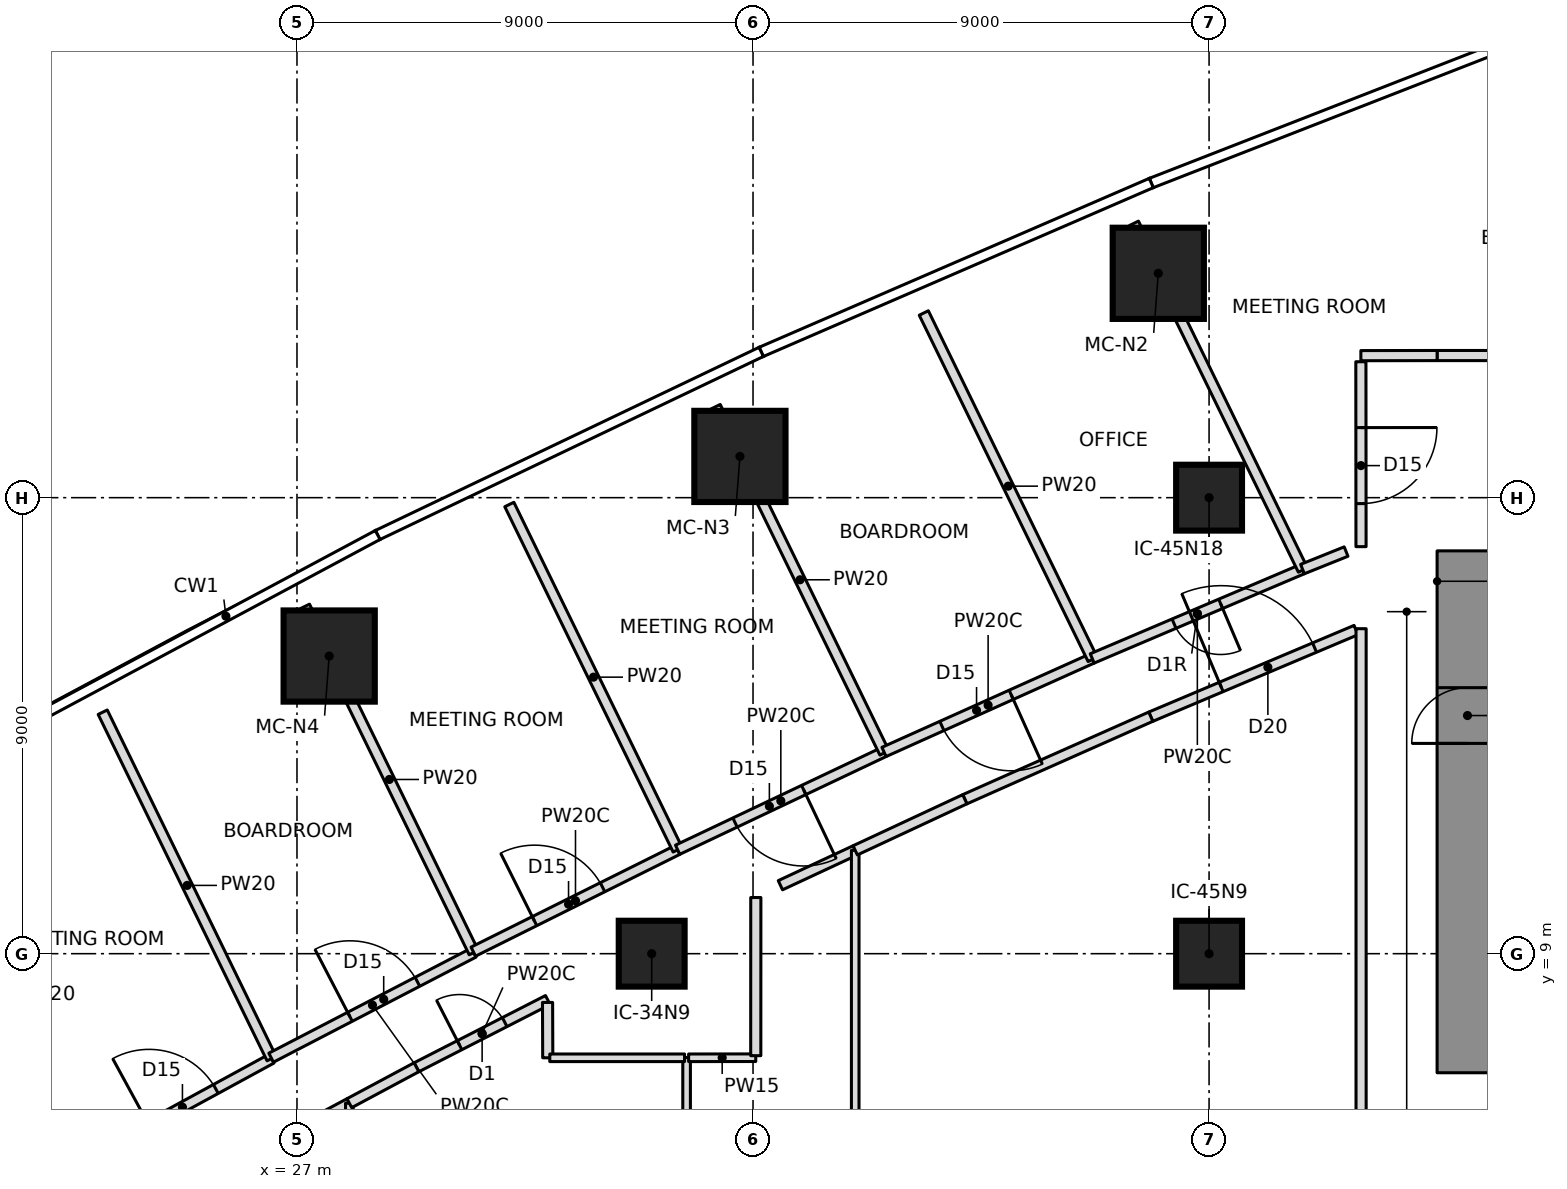
"""IFC4 building model, lengths in metres.
Left out: names, types, materials, properties, quantities, classifications, styles, units other than length and angle.
Written with IfcOpenShell. Run it as: python <this file> out.ifc"""

import sys

from ifc_helpers import new_model, si_unit, direction, frame, frame_2d, origin, origin_2d, place, context, subcontext, project, spatial, rectangle, extrude, element, fill, save


model = new_model("IFC4")
c1 = context("Model", 3, precision=1e-05, world=origin(), true_north=direction((0.0, 1.0)))
c2 = subcontext(c1, "Body", "Model", "MODEL_VIEW")
j1 = project(units=[si_unit("LENGTHUNIT", "METRE"), si_unit("PLANEANGLEUNIT", "RADIAN")], contexts=[c1])
p1 = place(None, origin())
s1 = spatial("IfcSite", under=j1, at=p1, CompositionType="ELEMENT")
p2 = place(p1, origin())
s2 = spatial("IfcBuilding", under=s1, at=p2, CompositionType="ELEMENT")
p3 = place(p2, frame((0.0, 0.0, 46.7)))
s3 = spatial("IfcBuildingStorey", under=s2, at=p3, CompositionType="ELEMENT", Elevation=46.7)
p4 = place(p3, frame((50.1, 6.65, 0.0), z_axis=(0.0, 0.0, 1.0), x_axis=(0.0, 1.0, 0.0)))
e1 = element("IfcWall", 1, at=p4, inside=s3, PredefinedType="SHEAR", context=c2, shape_type="SweptSolid", body=[
    extrude(rectangle(XDim=10.3, YDim=1.2, at=frame_2d((5.15, 0.0))), origin(), (0.0, 0.0, 1.0), 3.55),
])
p5 = place(p4, frame((6.5, 0.0, 0.0)))
e2 = element("IfcOpeningElement", 2, at=p5, cuts=e1, PredefinedType="OPENING", context=c2, shape_type="SweptSolid", body=[
    extrude(rectangle(XDim=1.1, YDim=2.1, at=frame_2d((0.55, 1.05))), frame((0.0, 0.61, 0.0), z_axis=(0.0, -1.0, 0.0), x_axis=(1.0, 0.0, 0.0)), (0.0, 0.0, 1.0), 1.22),
])
for number, where, z_axis, x_axis in (
    (3, (43.998, 22.428, 0.0), (0.0, 0.0, 1.0), (1.0, 0.0, 0.0)),
    (4, (35.741, 18.814, 0.0), (0.0, 0.0, 1.0), (1.0, 0.0, 0.0)),
    (5, (27.635, 14.874, 0.0), (0.0, 0.0, 1.0), (1.0, 0.0, 0.0)),
):
    element("IfcColumn", number, at=place(p3, frame(where, z_axis=z_axis, x_axis=x_axis)), inside=s3, PredefinedType="COLUMN", context=c2, shape_type="SweptSolid", body=[
        extrude(rectangle(XDim=1.8, YDim=1.8, at=origin_2d()), origin(), (0.0, 0.0, 1.0), 3.55),
    ])
for number, where, z_axis, x_axis in (
    (6, (34.0, 9.0, 0.0), (0.0, 0.0, 1.0), (1.0, 0.0, 0.0)),
    (7, (45.0, 9.0, 0.0), (0.0, 0.0, 1.0), (1.0, 0.0, 0.0)),
    (8, (45.0, 18.0, 0.0), (0.0, 0.0, 1.0), (1.0, 0.0, 0.0)),
):
    element("IfcColumn", number, at=place(p3, frame(where, z_axis=z_axis, x_axis=x_axis)), inside=s3, PredefinedType="COLUMN", context=c2, shape_type="SweptSolid", body=[
        extrude(rectangle(XDim=1.3, YDim=1.3, at=origin_2d()), origin(), (0.0, 0.0, 1.0), 3.55),
    ])
p6 = place(p3, frame((22.55, 4.755, 0.0), z_axis=(0.0, 0.0, 1.0), x_axis=(-0.438210669268, 0.898872298683, 0.0)))
e9 = element("IfcWall", 9, at=p6, inside=s3, PredefinedType="PARTITIONING", context=c2, shape_type="SweptSolid", body=[
    extrude(rectangle(XDim=7.612, YDim=0.2, at=frame_2d((3.806, 0.0))), origin(), (0.0, 0.0, 1.0), 3.25),
])
p7 = place(p3, frame((22.541, 4.773, 0.0), z_axis=(0.0, 0.0, 1.0), x_axis=(0.878098348451, 0.478480188146, 0.0)))
e10 = element("IfcWall", 10, at=p7, inside=s3, PredefinedType="PARTITIONING", context=c2, shape_type="SweptSolid", body=[
    extrude(rectangle(XDim=4.508, YDim=0.2, at=frame_2d((2.254, 0.0))), origin(), (0.0, 0.0, 1.0), 3.25),
])
p8 = place(p7, frame((1.754, 0.0, 0.0)))
e11 = element("IfcOpeningElement", 11, at=p8, cuts=e10, PredefinedType="OPENING", context=c2, shape_type="SweptSolid", body=[
    extrude(rectangle(XDim=1.5, YDim=2.1, at=frame_2d((0.75, 1.05))), frame((0.0, 0.11, 0.0), z_axis=(0.0, -1.0, 0.0), x_axis=(1.0, 0.0, 0.0)), (0.0, 0.0, 1.0), 0.22),
])
p9 = place(p3, frame((26.499, 6.929, 0.0), z_axis=(0.0, 0.0, 1.0), x_axis=(-0.438215539964, 0.898869924146, 0.0)))
e12 = element("IfcWall", 12, at=p9, inside=s3, PredefinedType="PARTITIONING", context=c2, shape_type="SweptSolid", body=[
    extrude(rectangle(XDim=7.605, YDim=0.2, at=frame_2d((3.803, 0.0))), origin(), (0.0, 0.0, 1.0), 3.25),
])
p10 = place(p3, frame((26.49, 6.948, 0.0), z_axis=(0.0, 0.0, 1.0), x_axis=(0.887638836985, 0.460540220911, 0.0)))
e13 = element("IfcWall", 13, at=p10, inside=s3, PredefinedType="PARTITIONING", context=c2, shape_type="SweptSolid", body=[
    extrude(rectangle(XDim=4.504, YDim=0.2, at=frame_2d((2.252, 0.0))), origin(), (0.0, 0.0, 1.0), 3.25),
])
p11 = place(p10, frame((1.752, 0.0, 0.0)))
e14 = element("IfcOpeningElement", 14, at=p11, cuts=e13, PredefinedType="OPENING", context=c2, shape_type="SweptSolid", body=[
    extrude(rectangle(XDim=1.5, YDim=2.1, at=frame_2d((0.75, 1.05))), frame((0.0, 0.11, 0.0), z_axis=(0.0, -1.0, 0.0), x_axis=(1.0, 0.0, 0.0)), (0.0, 0.0, 1.0), 0.22),
])
p12 = place(p3, frame((30.489, 9.022, 0.0), z_axis=(0.0, 0.0, 1.0), x_axis=(-0.43822365664, 0.898865967072, 0.0)))
e15 = element("IfcWall", 15, at=p12, inside=s3, PredefinedType="PARTITIONING", context=c2, shape_type="SweptSolid", body=[
    extrude(rectangle(XDim=7.601, YDim=0.2, at=frame_2d((3.801, 0.0))), origin(), (0.0, 0.0, 1.0), 3.25),
])
p13 = place(p3, frame((30.48, 9.04, 0.0), z_axis=(0.0, 0.0, 1.0), x_axis=(0.894989913054, 0.446086376761, 0.0)))
e16 = element("IfcWall", 16, at=p13, inside=s3, PredefinedType="PARTITIONING", context=c2, shape_type="SweptSolid", body=[
    extrude(rectangle(XDim=4.506, YDim=0.2, at=frame_2d((2.253, 0.0))), origin(), (0.0, 0.0, 1.0), 3.25),
])
p14 = place(p13, frame((1.35, 0.0, 0.0)))
e17 = element("IfcOpeningElement", 17, at=p14, cuts=e16, PredefinedType="OPENING", context=c2, shape_type="SweptSolid", body=[
    extrude(rectangle(XDim=1.5, YDim=2.1, at=frame_2d((0.75, 1.05))), frame((0.0, 0.11, 0.0), z_axis=(0.0, -1.0, 0.0), x_axis=(1.0, 0.0, 0.0)), (0.0, 0.0, 1.0), 0.22),
])
p15 = place(p3, frame((34.513, 11.05, 0.0), z_axis=(0.0, 0.0, 1.0), x_axis=(-0.438187612283, 0.898883538865, 0.0)))
e18 = element("IfcWall", 18, at=p15, inside=s3, PredefinedType="PARTITIONING", context=c2, shape_type="SweptSolid", body=[
    extrude(rectangle(XDim=7.582, YDim=0.2, at=frame_2d((3.791, 0.0))), origin(), (0.0, 0.0, 1.0), 3.25),
])
p16 = place(p3, frame((38.585, 12.981, 0.0), z_axis=(0.0, 0.0, 1.0), x_axis=(-0.903706948966, -0.428151550727, 0.0)))
e19 = element("IfcWall", 19, at=p16, inside=s3, PredefinedType="PARTITIONING", context=c2, shape_type="SweptSolid", body=[
    extrude(rectangle(XDim=4.506, YDim=0.2, at=frame_2d((2.253, 0.0))), origin(), (0.0, 0.0, 1.0), 3.25),
])
p17 = place(p16, frame((1.753, 0.0, 0.0)))
e20 = element("IfcOpeningElement", 20, at=p17, cuts=e19, PredefinedType="OPENING", context=c2, shape_type="SweptSolid", body=[
    extrude(rectangle(XDim=1.5, YDim=2.1, at=frame_2d((0.75, 1.05))), frame((0.0, 0.11, 0.0), z_axis=(0.0, -1.0, 0.0), x_axis=(1.0, 0.0, 0.0)), (0.0, 0.0, 1.0), 0.22),
])
p18 = place(p3, frame((38.594, 12.963, 0.0), z_axis=(0.0, 0.0, 1.0), x_axis=(-0.438197705697, 0.898878618459, 0.0)))
e21 = element("IfcWall", 21, at=p18, inside=s3, PredefinedType="PARTITIONING", context=c2, shape_type="SweptSolid", body=[
    extrude(rectangle(XDim=7.601, YDim=0.2, at=frame_2d((3.801, 0.0))), origin(), (0.0, 0.0, 1.0), 3.25),
])
p19 = place(p3, frame((42.694, 14.827, 0.0), z_axis=(0.0, 0.0, 1.0), x_axis=(-0.912193063794, -0.409760679381, 0.0)))
e22 = element("IfcWall", 22, at=p19, inside=s3, PredefinedType="PARTITIONING", context=c2, shape_type="SweptSolid", body=[
    extrude(rectangle(XDim=4.505, YDim=0.2, at=frame_2d((2.252, 0.0))), origin(), (0.0, 0.0, 1.0), 3.25),
])
p20 = place(p19, frame((1.752, 0.0, 0.0)))
e23 = element("IfcOpeningElement", 23, at=p20, cuts=e22, PredefinedType="OPENING", context=c2, shape_type="SweptSolid", body=[
    extrude(rectangle(XDim=1.5, YDim=2.1, at=frame_2d((0.75, 1.05))), frame((0.0, 0.11, 0.0), z_axis=(0.0, -1.0, 0.0), x_axis=(1.0, 0.0, 0.0)), (0.0, 0.0, 1.0), 0.22),
])
p21 = place(p3, frame((42.703, 14.809, 0.0), z_axis=(0.0, 0.0, 1.0), x_axis=(-0.438202247191, 0.898876404494, 0.0)))
e24 = element("IfcWall", 24, at=p21, inside=s3, PredefinedType="PARTITIONING", context=c2, shape_type="SweptSolid", body=[
    extrude(rectangle(XDim=7.605, YDim=0.2, at=frame_2d((3.802, 0.0))), origin(), (0.0, 0.0, 1.0), 3.25),
])
p22 = place(p3, frame((46.844, 16.591, 0.0), z_axis=(0.0, 0.0, 1.0), x_axis=(-0.92031727314, -0.39117274542, 0.0)))
e25 = element("IfcWall", 25, at=p22, inside=s3, PredefinedType="PARTITIONING", context=c2, shape_type="SweptSolid", body=[
    extrude(rectangle(XDim=4.509, YDim=0.2, at=frame_2d((2.254, 0.0))), origin(), (0.0, 0.0, 1.0), 3.25),
])
p23 = place(p22, frame((1.754, 0.0, 0.0)))
e26 = element("IfcOpeningElement", 26, at=p23, cuts=e25, PredefinedType="OPENING", context=c2, shape_type="SweptSolid", body=[
    extrude(rectangle(XDim=1.0, YDim=2.1, at=frame_2d((0.5, 1.05))), frame((0.0, 0.11, 0.0), z_axis=(0.0, -1.0, 0.0), x_axis=(1.0, 0.0, 0.0)), (0.0, 0.0, 1.0), 0.22),
])
p24 = place(p3, frame((46.852, 16.573, 0.0), z_axis=(0.0, 0.0, 1.0), x_axis=(-0.438196739796, 0.898879089328, 0.0)))
e27 = element("IfcWall", 27, at=p24, inside=s3, PredefinedType="PARTITIONING", context=c2, shape_type="SweptSolid", body=[
    extrude(rectangle(XDim=7.611, YDim=0.2, at=frame_2d((3.806, 0.0))), origin(), (0.0, 0.0, 1.0), 3.25),
])
p25 = place(p3, frame((25.817, 4.863, 0.0), z_axis=(0.0, 0.0, 1.0), x_axis=(0.881650280758, 0.471903361335, 0.0)))
e28 = element("IfcWall", 28, at=p25, inside=s3, PredefinedType="PARTITIONING", context=c2, shape_type="SweptSolid", body=[
    extrude(rectangle(XDim=2.514, YDim=0.2, at=frame_2d((1.257, 0.0))), origin(), (0.0, 0.0, 1.0), 3.25),
])
p26 = place(p3, frame((28.033, -6.049, 0.0), z_axis=(0.0, 0.0, 1.0), x_axis=(0.0, 1.0, 0.0)))
e29 = element("IfcWall", 29, at=p26, inside=s3, PredefinedType="PARTITIONING", context=c2, shape_type="SweptSolid", body=[
    extrude(rectangle(XDim=12.099, YDim=0.15, at=frame_2d((6.049, 0.0))), origin(), (0.0, 0.0, 1.0), 3.25),
])
p27 = place(p3, frame((29.357, 6.758, 0.0), z_axis=(0.0, 0.0, 1.0), x_axis=(0.890213377055, 0.455543788579, 0.0)))
e30 = element("IfcWall", 30, at=p27, inside=s3, PredefinedType="PARTITIONING", context=c2, shape_type="SweptSolid", body=[
    extrude(rectangle(XDim=2.912, YDim=0.2, at=frame_2d((1.456, 0.0))), origin(), (0.0, 0.0, 1.0), 3.25),
])
p28 = place(p27, frame((0.956, 0.0, 0.0)))
e31 = element("IfcOpeningElement", 31, at=p28, cuts=e30, PredefinedType="OPENING", context=c2, shape_type="SweptSolid", body=[
    extrude(rectangle(XDim=1.0, YDim=2.1, at=frame_2d((0.5, 1.05))), frame((0.0, 0.11, 0.0), z_axis=(0.0, -1.0, 0.0), x_axis=(1.0, 0.0, 0.0)), (0.0, 0.0, 1.0), 0.22),
])
p29 = place(p3, frame((28.033, 6.049, 0.0), z_axis=(0.0, 0.0, 1.0), x_axis=(0.881663555886, 0.471878558764, 0.0)))
e32 = element("IfcWall", 32, at=p29, inside=s3, PredefinedType="PARTITIONING", context=c2, shape_type="SweptSolid", body=[
    extrude(rectangle(XDim=1.502, YDim=0.2, at=frame_2d((0.751, 0.0))), origin(), (0.0, 0.0, 1.0), 3.25),
])
p30 = place(p3, frame((34.689, -6.95, 0.0), z_axis=(0.0, 0.0, 1.0), x_axis=(0.0, 1.0, 0.0)))
e33 = element("IfcWall", 33, at=p30, inside=s3, PredefinedType="PARTITIONING", context=c2, shape_type="SweptSolid", body=[
    extrude(rectangle(XDim=13.9, YDim=0.15, at=frame_2d((6.95, 0.0))), origin(), (0.0, 0.0, 1.0), 3.25),
])
p31 = place(p3, frame((36.54, 10.351, 0.0), z_axis=(0.0, 0.0, 1.0), x_axis=(0.906378304335, 0.422467003955, 0.0)))
e34 = element("IfcWall", 34, at=p31, inside=s3, PredefinedType="PARTITIONING", context=c2, shape_type="SweptSolid", body=[
    extrude(rectangle(XDim=1.629, YDim=0.2, at=frame_2d((0.814, 0.0))), origin(), (0.0, 0.0, 1.0), 3.25),
])
p32 = place(p3, frame((38.017, -11.039, 0.0), z_axis=(0.0, 0.0, 1.0), x_axis=(0.0, 1.0, 0.0)))
e35 = element("IfcWall", 35, at=p32, inside=s3, PredefinedType="PARTITIONING", context=c2, shape_type="SweptSolid", body=[
    extrude(rectangle(XDim=22.079, YDim=0.15, at=frame_2d((11.039, 0.0))), origin(), (0.0, 0.0, 1.0), 3.25),
])
p33 = place(p3, frame((43.85, 13.677, 0.0), z_axis=(0.0, 0.0, 1.0), x_axis=(0.921265924084, 0.388933281068, 0.0)))
e36 = element("IfcWall", 36, at=p33, inside=s3, PredefinedType="PARTITIONING", context=c2, shape_type="SweptSolid", body=[
    extrude(rectangle(XDim=4.396, YDim=0.2, at=frame_2d((2.198, 0.0))), origin(), (0.0, 0.0, 1.0), 3.25),
])
p34 = place(p33, frame((1.508, 0.0, 0.0)))
e37 = element("IfcOpeningElement", 37, at=p34, cuts=e36, PredefinedType="OPENING", context=c2, shape_type="SweptSolid", body=[
    extrude(rectangle(XDim=2.0, YDim=2.4, at=frame_2d((1.0, 1.2))), frame((0.0, 0.11, 0.0), z_axis=(0.0, -1.0, 0.0), x_axis=(1.0, 0.0, 0.0)), (0.0, 0.0, 1.0), 0.22),
])
p35 = place(p3, frame((40.18, 12.048, 0.0), z_axis=(0.0, 0.0, 1.0), x_axis=(0.913986953061, 0.405743576209, 0.0)))
e38 = element("IfcWall", 38, at=p35, inside=s3, PredefinedType="PARTITIONING", context=c2, shape_type="SweptSolid", body=[
    extrude(rectangle(XDim=4.016, YDim=0.2, at=frame_2d((2.008, 0.0))), origin(), (0.0, 0.0, 1.0), 3.25),
])
p36 = place(p3, frame((38.017, 11.039, 0.0), z_axis=(0.0, 0.0, 1.0), x_axis=(0.906326822236, 0.422577438223, 0.0)))
e39 = element("IfcWall", 39, at=p36, inside=s3, PredefinedType="PARTITIONING", context=c2, shape_type="SweptSolid", body=[
    extrude(rectangle(XDim=2.387, YDim=0.2, at=frame_2d((1.193, 0.0))), origin(), (0.0, 0.0, 1.0), 3.25),
])
p37 = place(p3, frame((54.597, 20.805, 0.0), z_axis=(0.0, 0.0, 1.0), x_axis=(-1.0, 0.0, 0.0)))
e40 = element("IfcWall", 40, at=p37, inside=s3, PredefinedType="PARTITIONING", context=c2, shape_type="SweptSolid", body=[
    extrude(rectangle(XDim=5.097, YDim=0.2, at=frame_2d((2.548, 0.0))), origin(), (0.0, 0.0, 1.0), 3.25),
])
p38 = place(p37, frame((2.048, 0.0, 0.0)))
e41 = element("IfcOpeningElement", 41, at=p38, cuts=e40, PredefinedType="OPENING", context=c2, shape_type="SweptSolid", body=[
    extrude(rectangle(XDim=1.5, YDim=2.1, at=frame_2d((0.75, 1.05))), frame((0.0, 0.11, 0.0), z_axis=(0.0, -1.0, 0.0), x_axis=(1.0, 0.0, 0.0)), (0.0, 0.0, 1.0), 0.22),
])
p39 = place(p3, frame((47.704, 16.936, 0.0), z_axis=(0.0, 0.0, 1.0), x_axis=(-0.927985537407, -0.372616213232, 0.0)))
e42 = element("IfcWall", 42, at=p39, inside=s3, PredefinedType="PARTITIONING", context=c2, shape_type="SweptSolid", body=[
    extrude(rectangle(XDim=0.927, YDim=0.2, at=frame_2d((0.463, 0.0))), origin(), (0.0, 0.0, 1.0), 3.25),
])
p40 = place(p3, frame((31.945, 8.037, 0.0), z_axis=(0.0, 0.0, 1.0), x_axis=(0.003576195281, -0.999993605393, 0.0)))
e43 = element("IfcWall", 43, at=p40, inside=s3, PredefinedType="PARTITIONING", context=c2, shape_type="SweptSolid", body=[
    extrude(rectangle(XDim=1.092, YDim=0.2, at=frame_2d((0.546, 0.0))), origin(), (0.0, 0.0, 1.0), 3.25),
])
p41 = place(p3, frame((31.989, 6.945, 0.0), z_axis=(0.0, 0.0, 1.0), x_axis=(1.0, 0.0, 0.0)))
e44 = element("IfcWall", 44, at=p41, inside=s3, PredefinedType="PARTITIONING", context=c2, shape_type="SweptSolid", body=[
    extrude(rectangle(XDim=2.66, YDim=0.15, at=frame_2d((1.33, 0.0))), origin(), (0.0, 0.0, 1.0), 3.25),
])
p42 = place(p3, frame((34.729, 6.945, 0.0), z_axis=(0.0, 0.0, 1.0), x_axis=(0.999999168148, 0.001289845988, 0.0)))
e45 = element("IfcWall", 45, at=p42, inside=s3, PredefinedType="PARTITIONING", context=c2, shape_type="SweptSolid", body=[
    extrude(rectangle(XDim=1.325, YDim=0.15, at=frame_2d((0.663, 0.0))), origin(), (0.0, 0.0, 1.0), 3.25),
])
p43 = place(p3, frame((36.054, 6.987, 0.0), z_axis=(0.0, 0.0, 1.0), x_axis=(0.000312842156, 0.999999951065, 0.0)))
e46 = element("IfcWall", 46, at=p43, inside=s3, PredefinedType="PARTITIONING", context=c2, shape_type="SweptSolid", body=[
    extrude(rectangle(XDim=3.122, YDim=0.2, at=frame_2d((1.561, 0.0))), origin(), (0.0, 0.0, 1.0), 3.25),
])
p44 = place(p3, frame((48.0, 15.414, 0.0), z_axis=(0.0, 0.0, 1.0), x_axis=(0.0, -1.0, 0.0)))
e47 = element("IfcWall", 47, at=p44, inside=s3, PredefinedType="PARTITIONING", context=c2, shape_type="SweptSolid", body=[
    extrude(rectangle(XDim=30.828, YDim=0.2, at=frame_2d((15.414, 0.0))), origin(), (0.0, 0.0, 1.0), 3.25),
])
p45 = place(p3, frame((49.5, 20.805, 0.0), z_axis=(0.0, 0.0, 1.0), x_axis=(-0.999998933031, -0.001460800259, 0.0)))
e48 = element("IfcWall", 48, at=p45, inside=s3, PredefinedType="PARTITIONING", context=c2, shape_type="SweptSolid", body=[
    extrude(rectangle(XDim=1.504, YDim=0.2, at=frame_2d((0.752, 0.0))), origin(), (0.0, 0.0, 1.0), 3.25),
])
p46 = place(p3, frame((47.996, 20.683, 0.0), z_axis=(0.0, 0.0, 1.0), x_axis=(0.000802729021, -0.999999677813, 0.0)))
e49 = element("IfcWall", 49, at=p46, inside=s3, PredefinedType="PARTITIONING", context=c2, shape_type="SweptSolid", body=[
    extrude(rectangle(XDim=3.65, YDim=0.2, at=frame_2d((1.825, 0.0))), origin(), (0.0, 0.0, 1.0), 3.25),
])
p47 = place(p46, frame((1.3, 0.0, 0.0)))
e50 = element("IfcOpeningElement", 50, at=p47, cuts=e49, PredefinedType="OPENING", context=c2, shape_type="SweptSolid", body=[
    extrude(rectangle(XDim=1.5, YDim=2.1, at=frame_2d((0.75, 1.05))), frame((0.0, 0.11, 0.0), z_axis=(0.0, -1.0, 0.0), x_axis=(1.0, 0.0, 0.0)), (0.0, 0.0, 1.0), 0.22),
])
p48 = place(p8, origin())
e51 = element("IfcDoor", 51, at=p48, inside=s3, OperationType="DOUBLE_DOOR_SINGLE_SWING", PredefinedType="DOOR", context=c2, shape_type="SweptSolid", body=[
    extrude(rectangle(XDim=1.5, YDim=2.1, at=frame_2d((0.75, 1.05))), frame((0.0, 0.025, 0.0), z_axis=(0.0, -1.0, 0.0), x_axis=(1.0, 0.0, 0.0)), (0.0, 0.0, 1.0), 0.05),
])
fill(e11, e51)
p49 = place(p11, origin())
e52 = element("IfcDoor", 52, at=p49, inside=s3, OperationType="DOUBLE_DOOR_SINGLE_SWING", PredefinedType="DOOR", context=c2, shape_type="SweptSolid", body=[
    extrude(rectangle(XDim=1.5, YDim=2.1, at=frame_2d((0.75, 1.05))), frame((0.0, 0.025, 0.0), z_axis=(0.0, -1.0, 0.0), x_axis=(1.0, 0.0, 0.0)), (0.0, 0.0, 1.0), 0.05),
])
fill(e14, e52)
p50 = place(p14, origin())
e53 = element("IfcDoor", 53, at=p50, inside=s3, OperationType="DOUBLE_DOOR_SINGLE_SWING", PredefinedType="DOOR", context=c2, shape_type="SweptSolid", body=[
    extrude(rectangle(XDim=1.5, YDim=2.1, at=frame_2d((0.75, 1.05))), frame((0.0, 0.025, 0.0), z_axis=(0.0, -1.0, 0.0), x_axis=(1.0, 0.0, 0.0)), (0.0, 0.0, 1.0), 0.05),
])
fill(e17, e53)
p51 = place(p17, origin())
e54 = element("IfcDoor", 54, at=p51, inside=s3, OperationType="DOUBLE_DOOR_SINGLE_SWING", PredefinedType="DOOR", context=c2, shape_type="SweptSolid", body=[
    extrude(rectangle(XDim=1.5, YDim=2.1, at=frame_2d((0.75, 1.05))), frame((0.0, 0.025, 0.0), z_axis=(0.0, -1.0, 0.0), x_axis=(1.0, 0.0, 0.0)), (0.0, 0.0, 1.0), 0.05),
])
fill(e20, e54)
p52 = place(p20, origin())
e55 = element("IfcDoor", 55, at=p52, inside=s3, OperationType="DOUBLE_DOOR_SINGLE_SWING", PredefinedType="DOOR", context=c2, shape_type="SweptSolid", body=[
    extrude(rectangle(XDim=1.5, YDim=2.1, at=frame_2d((0.75, 1.05))), frame((0.0, 0.025, 0.0), z_axis=(0.0, -1.0, 0.0), x_axis=(1.0, 0.0, 0.0)), (0.0, 0.0, 1.0), 0.05),
])
fill(e23, e55)
p53 = place(p23, origin())
e56 = element("IfcDoor", 56, at=p53, inside=s3, OperationType="SINGLE_SWING_RIGHT", PredefinedType="DOOR", context=c2, shape_type="SweptSolid", body=[
    extrude(rectangle(XDim=1.0, YDim=2.1, at=frame_2d((0.5, 1.05))), frame((0.0, 0.025, 0.0), z_axis=(0.0, -1.0, 0.0), x_axis=(1.0, 0.0, 0.0)), (0.0, 0.0, 1.0), 0.05),
])
fill(e26, e56)
p54 = place(p28, origin())
e57 = element("IfcDoor", 57, at=p54, inside=s3, OperationType="SINGLE_SWING_LEFT", PredefinedType="DOOR", context=c2, shape_type="SweptSolid", body=[
    extrude(rectangle(XDim=1.0, YDim=2.1, at=frame_2d((0.5, 1.05))), frame((0.0, 0.025, 0.0), z_axis=(0.0, -1.0, 0.0), x_axis=(1.0, 0.0, 0.0)), (0.0, 0.0, 1.0), 0.05),
])
fill(e31, e57)
p55 = place(p34, origin())
e58 = element("IfcDoor", 58, at=p55, inside=s3, OperationType="DOUBLE_DOOR_SINGLE_SWING", PredefinedType="DOOR", context=c2, shape_type="SweptSolid", body=[
    extrude(rectangle(XDim=2.0, YDim=2.4, at=frame_2d((1.0, 1.2))), frame((0.0, 0.025, 0.0), z_axis=(0.0, -1.0, 0.0), x_axis=(1.0, 0.0, 0.0)), (0.0, 0.0, 1.0), 0.05),
])
fill(e37, e58)
p56 = place(p47, origin())
e59 = element("IfcDoor", 59, at=p56, inside=s3, OperationType="DOUBLE_DOOR_SINGLE_SWING", PredefinedType="DOOR", context=c2, shape_type="SweptSolid", body=[
    extrude(rectangle(XDim=1.5, YDim=2.1, at=frame_2d((0.75, 1.05))), frame((0.0, 0.025, 0.0), z_axis=(0.0, -1.0, 0.0), x_axis=(1.0, 0.0, 0.0)), (0.0, 0.0, 1.0), 0.05),
])
fill(e50, e59)
p57 = place(p5, origin())
e60 = element("IfcDoor", 60, at=p57, inside=s3, OperationType="SINGLE_SWING_RIGHT", PredefinedType="DOOR", context=c2, shape_type="SweptSolid", body=[
    extrude(rectangle(XDim=1.1, YDim=2.1, at=frame_2d((0.55, 1.05))), frame((0.0, 0.025, 0.0), z_axis=(0.0, -1.0, 0.0), x_axis=(1.0, 0.0, 0.0)), (0.0, 0.0, 1.0), 0.05),
])
fill(e2, e60)
save(model, sys.argv[1])
